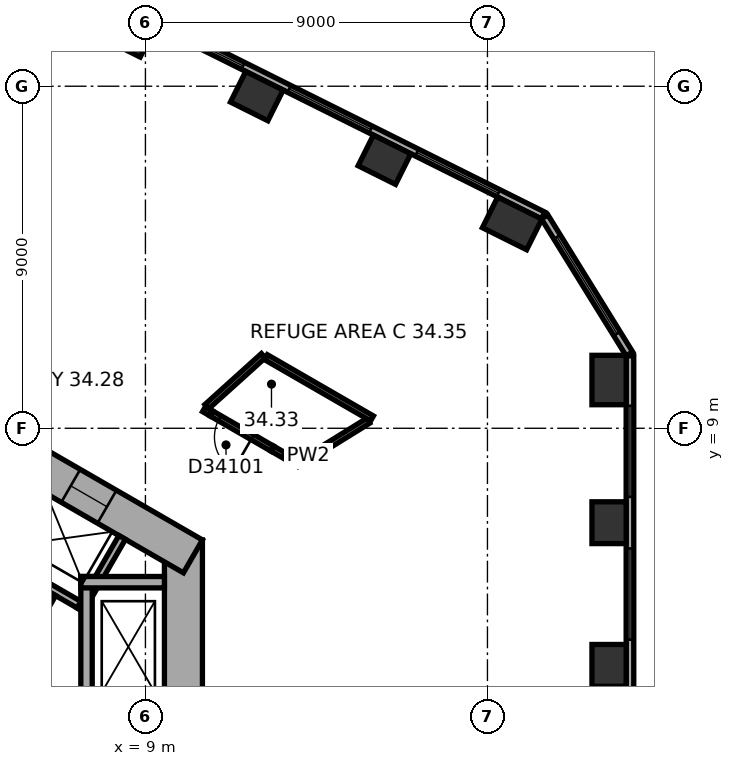
"""IFC4 building model, lengths in metres.
Left out: names, types, materials, properties, quantities, classifications, styles, units other than length and angle.
Written with IfcOpenShell. Run it as: python <this file> out.ifc"""

import sys

from ifc_helpers import new_model, si_unit, direction, frame, frame_2d, origin, origin_2d, place, context, subcontext, project, spatial, rectangle, extrude, element, fill, save


model = new_model("IFC4")
c1 = context("Model", 3, precision=1e-05, world=origin(), true_north=direction((0.0, 1.0)))
c2 = subcontext(c1, "Body", "Model", "MODEL_VIEW")
j1 = project(units=[si_unit("LENGTHUNIT", "METRE"), si_unit("PLANEANGLEUNIT", "RADIAN")], contexts=[c1])
p1 = place(None, origin())
s1 = spatial("IfcSite", under=j1, at=p1, CompositionType="ELEMENT")
p2 = place(p1, origin())
s2 = spatial("IfcBuilding", under=s1, at=p2, CompositionType="ELEMENT")
p3 = place(p2, frame((0.0, 0.0, 139.2)))
s3 = spatial("IfcBuildingStorey", under=s2, at=p3, CompositionType="ELEMENT", Elevation=139.2)
for number, where, z_axis, x_axis in (
    (1, (21.2, 2.761, 0.0), (0.0, 0.0, 1.0), (0.0, 1.0, 0.0)),
    (2, (21.2, 6.515, 0.0), (0.0, 0.0, 1.0), (0.0, 1.0, 0.0)),
):
    element("IfcColumn", number, at=place(p3, frame(where, z_axis=z_axis, x_axis=x_axis)), inside=s3, PredefinedType="COLUMN", context=c2, shape_type="SweptSolid", body=[
        extrude(rectangle(XDim=1.1, YDim=0.9, at=origin_2d()), origin(), (0.0, 0.0, 1.0), 7.4),
    ])
for number, where, z_axis, x_axis in (
    (3, (21.2, 10.27, 0.0), (0.0, 0.0, 1.0), (0.0, 1.0, 0.0)),
    (4, (18.65, 14.39, 0.0), (0.0, 0.0, 1.0), (-0.895, 0.446, 0.0)),
):
    element("IfcColumn", number, at=place(p3, frame(where, z_axis=z_axis, x_axis=x_axis)), inside=s3, PredefinedType="COLUMN", context=c2, shape_type="SweptSolid", body=[
        extrude(rectangle(XDim=1.3, YDim=0.9, at=origin_2d()), origin(), (0.0, 0.0, 1.0), 7.4),
    ])
for number, where, z_axis, x_axis in (
    (5, (15.29, 16.065, 0.0), (0.0, 0.0, 1.0), (-0.895, 0.446, 0.0)),
    (6, (11.931, 17.74, 0.0), (0.0, 0.0, 1.0), (-0.895, 0.446, 0.0)),
    (7, (8.571, 19.416, 0.0), (0.0, 0.0, 1.0), (-0.895, 0.446, 0.0)),
):
    element("IfcColumn", number, at=place(p3, frame(where, z_axis=z_axis, x_axis=x_axis)), inside=s3, PredefinedType="COLUMN", context=c2, shape_type="SweptSolid", body=[
        extrude(rectangle(XDim=1.1, YDim=0.9, at=origin_2d()), origin(), (0.0, 0.0, 1.0), 7.4),
    ])
p4 = place(p3, frame((10.0, -6.062, 0.0), z_axis=(0.0, 0.0, 1.0), x_axis=(0.0, 1.0, 0.0)))
e8 = element("IfcWall", 8, at=p4, inside=s3, PredefinedType="SHEAR", context=c2, shape_type="SweptSolid", body=[
    extrude(rectangle(XDim=12.125, YDim=1.0, at=frame_2d((6.062, 0.0))), origin(), (0.0, 0.0, 1.0), 7.4),
])
p5 = place(p4, frame((6.262, 0.0, 0.0)))
e9 = element("IfcOpeningElement", 9, at=p5, cuts=e8, PredefinedType="OPENING", context=c2, shape_type="SweptSolid", body=[
    extrude(rectangle(XDim=1.5, YDim=2.1, at=frame_2d((0.75, 1.05))), frame((0.0, 0.51, 0.0), z_axis=(0.0, -1.0, 0.0), x_axis=(1.0, 0.0, 0.0)), (0.0, 0.0, 1.0), 1.02),
])
p6 = place(p4, frame((1.712, 0.0, 0.0)))
e10 = element("IfcOpeningElement", 10, at=p6, cuts=e8, PredefinedType="OPENING", context=c2, shape_type="SweptSolid", body=[
    extrude(rectangle(XDim=1.1, YDim=2.1, at=frame_2d((0.55, 1.05))), frame((0.0, 0.51, 0.0), z_axis=(0.0, -1.0, 0.0), x_axis=(1.0, 0.0, 0.0)), (0.0, 0.0, 1.0), 1.02),
])
p7 = place(p4, frame((4.312, 0.0, 0.0)))
e11 = element("IfcOpeningElement", 11, at=p7, cuts=e8, PredefinedType="OPENING", context=c2, shape_type="SweptSolid", body=[
    extrude(rectangle(XDim=1.1, YDim=2.1, at=frame_2d((0.55, 1.05))), frame((0.0, 0.51, 0.0), z_axis=(0.0, -1.0, 0.0), x_axis=(1.0, 0.0, 0.0)), (0.0, 0.0, 1.0), 1.02),
])
p8 = place(p3, frame((10.25, 5.629, 0.0), z_axis=(0.0, 0.0, 1.0), x_axis=(-0.866022616891, 0.50000482701, 0.0)))
e12 = element("IfcWall", 12, at=p8, inside=s3, PredefinedType="SHEAR", context=c2, shape_type="SweptSolid", body=[
    extrude(rectangle(XDim=12.125, YDim=1.0, at=frame_2d((6.062, 0.0))), origin(), (0.0, 0.0, 1.0), 7.4),
])
p9 = place(p8, frame((2.612, 0.0, 0.0)))
e13 = element("IfcOpeningElement", 13, at=p9, cuts=e12, PredefinedType="OPENING", context=c2, shape_type="SweptSolid", body=[
    extrude(rectangle(XDim=1.1, YDim=2.1, at=frame_2d((0.55, 1.05))), frame((0.0, 0.51, 0.0), z_axis=(0.0, -1.0, 0.0), x_axis=(1.0, 0.0, 0.0)), (0.0, 0.0, 1.0), 1.02),
])
p10 = place(p8, frame((5.212, 0.0, 0.0)))
e14 = element("IfcOpeningElement", 14, at=p10, cuts=e12, PredefinedType="OPENING", context=c2, shape_type="SweptSolid", body=[
    extrude(rectangle(XDim=1.1, YDim=2.1, at=frame_2d((0.55, 1.05))), frame((0.0, 0.51, 0.0), z_axis=(0.0, -1.0, 0.0), x_axis=(1.0, 0.0, 0.0)), (0.0, 0.0, 1.0), 1.02),
])
p11 = place(p8, frame((7.812, 0.0, 0.0)))
e15 = element("IfcOpeningElement", 15, at=p11, cuts=e12, PredefinedType="OPENING", context=c2, shape_type="SweptSolid", body=[
    extrude(rectangle(XDim=1.1, YDim=2.1, at=frame_2d((0.55, 1.05))), frame((0.0, 0.51, 0.0), z_axis=(0.0, -1.0, 0.0), x_axis=(1.0, 0.0, 0.0)), (0.0, 0.0, 1.0), 1.02),
])
p12 = place(p3, frame((21.75, -9.138, 0.0), z_axis=(0.0, 0.0, 1.0), x_axis=(0.0, 1.0, 0.0)))
e16 = element("IfcWall", 16, at=p12, inside=s3, PredefinedType="STANDARD", context=c2, shape_type="SweptSolid", body=[
    extrude(rectangle(XDim=20.044, YDim=0.2, at=frame_2d((10.022, 0.0))), origin(), (0.0, 0.0, 1.0), 7.4),
])
p13 = place(p12, frame((1.314, 0.0, 0.8)))
e17 = element("IfcOpeningElement", 17, at=p13, cuts=e16, PredefinedType="OPENING", context=c2, shape_type="SweptSolid", body=[
    extrude(rectangle(XDim=2.4, YDim=4.2, at=frame_2d((1.2, 2.1))), frame((0.0, 0.11, 0.0), z_axis=(0.0, -1.0, 0.0), x_axis=(1.0, 0.0, 0.0)), (0.0, 0.0, 1.0), 0.22),
])
p14 = place(p12, frame((5.069, 0.0, 0.8)))
e18 = element("IfcOpeningElement", 18, at=p14, cuts=e16, PredefinedType="OPENING", context=c2, shape_type="SweptSolid", body=[
    extrude(rectangle(XDim=2.4, YDim=4.2, at=frame_2d((1.2, 2.1))), frame((0.0, 0.11, 0.0), z_axis=(0.0, -1.0, 0.0), x_axis=(1.0, 0.0, 0.0)), (0.0, 0.0, 1.0), 0.22),
])
p15 = place(p12, frame((8.823, 0.0, 0.8)))
e19 = element("IfcOpeningElement", 19, at=p15, cuts=e16, PredefinedType="OPENING", context=c2, shape_type="SweptSolid", body=[
    extrude(rectangle(XDim=2.4, YDim=4.2, at=frame_2d((1.2, 2.1))), frame((0.0, 0.11, 0.0), z_axis=(0.0, -1.0, 0.0), x_axis=(1.0, 0.0, 0.0)), (0.0, 0.0, 1.0), 0.22),
])
p16 = place(p12, frame((12.577, 0.0, 0.8)))
e20 = element("IfcOpeningElement", 20, at=p16, cuts=e16, PredefinedType="OPENING", context=c2, shape_type="SweptSolid", body=[
    extrude(rectangle(XDim=2.4, YDim=4.2, at=frame_2d((1.2, 2.1))), frame((0.0, 0.11, 0.0), z_axis=(0.0, -1.0, 0.0), x_axis=(1.0, 0.0, 0.0)), (0.0, 0.0, 1.0), 0.22),
])
p17 = place(p12, frame((16.331, 0.0, 0.8)))
e21 = element("IfcOpeningElement", 21, at=p17, cuts=e16, PredefinedType="OPENING", context=c2, shape_type="SweptSolid", body=[
    extrude(rectangle(XDim=2.4, YDim=4.2, at=frame_2d((1.2, 2.1))), frame((0.0, 0.11, 0.0), z_axis=(0.0, -1.0, 0.0), x_axis=(1.0, 0.0, 0.0)), (0.0, 0.0, 1.0), 0.22),
])
p18 = place(p3, frame((21.735, 10.958, 0.0), z_axis=(0.0, 0.0, 1.0), x_axis=(-0.526213807775, 0.850352296702, 0.0)))
e22 = element("IfcWall", 22, at=p18, inside=s3, PredefinedType="STANDARD", context=c2, shape_type="SweptSolid", body=[
    extrude(rectangle(XDim=4.238, YDim=0.2, at=frame_2d((2.119, 0.0))), origin(), (0.0, 0.0, 1.0), 7.4),
])
p19 = place(p18, frame((0.619, 0.0, 0.8)))
e23 = element("IfcOpeningElement", 23, at=p19, cuts=e22, PredefinedType="OPENING", context=c2, shape_type="SweptSolid", body=[
    extrude(rectangle(XDim=3.0, YDim=4.2, at=frame_2d((1.5, 2.1))), frame((0.0, 0.11, 0.0), z_axis=(0.0, -1.0, 0.0), x_axis=(1.0, 0.0, 0.0)), (0.0, 0.0, 1.0), 0.22),
])
p20 = place(p3, frame((19.464, 14.599, 0.0), z_axis=(0.0, 0.0, 1.0), x_axis=(-0.894935755043, 0.446195018289, 0.0)))
e24 = element("IfcWall", 24, at=p20, inside=s3, PredefinedType="STANDARD", context=c2, shape_type="SweptSolid", body=[
    extrude(rectangle(XDim=20.044, YDim=0.2, at=frame_2d((10.022, 0.0))), origin(), (0.0, 0.0, 1.0), 7.4),
])
p21 = place(p20, frame((1.313, 0.0, 0.8)))
e25 = element("IfcOpeningElement", 25, at=p21, cuts=e24, PredefinedType="OPENING", context=c2, shape_type="SweptSolid", body=[
    extrude(rectangle(XDim=2.4, YDim=4.2, at=frame_2d((1.2, 2.1))), frame((0.0, 0.11, 0.0), z_axis=(0.0, -1.0, 0.0), x_axis=(1.0, 0.0, 0.0)), (0.0, 0.0, 1.0), 0.22),
])
p22 = place(p20, frame((5.067, 0.0, 0.8)))
e26 = element("IfcOpeningElement", 26, at=p22, cuts=e24, PredefinedType="OPENING", context=c2, shape_type="SweptSolid", body=[
    extrude(rectangle(XDim=2.4, YDim=4.2, at=frame_2d((1.2, 2.1))), frame((0.0, 0.11, 0.0), z_axis=(0.0, -1.0, 0.0), x_axis=(1.0, 0.0, 0.0)), (0.0, 0.0, 1.0), 0.22),
])
p23 = place(p20, frame((8.821, 0.0, 0.8)))
e27 = element("IfcOpeningElement", 27, at=p23, cuts=e24, PredefinedType="OPENING", context=c2, shape_type="SweptSolid", body=[
    extrude(rectangle(XDim=2.4, YDim=4.2, at=frame_2d((1.2, 2.1))), frame((0.0, 0.11, 0.0), z_axis=(0.0, -1.0, 0.0), x_axis=(1.0, 0.0, 0.0)), (0.0, 0.0, 1.0), 0.22),
])
p24 = place(p20, frame((12.575, 0.0, 0.8)))
e28 = element("IfcOpeningElement", 28, at=p24, cuts=e24, PredefinedType="OPENING", context=c2, shape_type="SweptSolid", body=[
    extrude(rectangle(XDim=2.4, YDim=4.2, at=frame_2d((1.2, 2.1))), frame((0.0, 0.11, 0.0), z_axis=(0.0, -1.0, 0.0), x_axis=(1.0, 0.0, 0.0)), (0.0, 0.0, 1.0), 0.22),
])
p25 = place(p20, frame((16.329, 0.0, 0.8)))
e29 = element("IfcOpeningElement", 29, at=p25, cuts=e24, PredefinedType="OPENING", context=c2, shape_type="SweptSolid", body=[
    extrude(rectangle(XDim=2.4, YDim=4.2, at=frame_2d((1.2, 2.1))), frame((0.0, 0.11, 0.0), z_axis=(0.0, -1.0, 0.0), x_axis=(1.0, 0.0, 0.0)), (0.0, 0.0, 1.0), 0.22),
])
p26 = place(p3, frame((7.424, 4.259, 0.0), z_axis=(0.0, 0.0, 1.0), x_axis=(-0.866026010844, 0.49999894854, 0.0)))
e30 = element("IfcWall", 30, at=p26, inside=s3, PredefinedType="PARTITIONING", context=c2, shape_type="SweptSolid", body=[
    extrude(rectangle(XDim=8.0, YDim=0.2, at=frame_2d((4.0, 0.0))), origin(), (0.0, 0.0, 1.0), 7.12),
])
p27 = place(p3, frame((7.287, 4.222, 0.0), z_axis=(0.0, 0.0, 1.0), x_axis=(0.499946605688, 0.86605622881, 0.0)))
e31 = element("IfcWall", 31, at=p27, inside=s3, PredefinedType="PARTITIONING", context=c2, shape_type="SweptSolid", body=[
    extrude(rectangle(XDim=2.2, YDim=0.2, at=frame_2d((1.1, 0.0))), origin(), (0.0, 0.0, 1.0), 7.12),
])
p28 = place(p3, frame((4.158, 0.602, 0.0), z_axis=(0.0, 0.0, 1.0), x_axis=(0.499977259774, 0.866038532462, 0.0)))
e32 = element("IfcWall", 32, at=p28, inside=s3, PredefinedType="SHEAR", context=c2, shape_type="SweptSolid", body=[
    extrude(rectangle(XDim=4.7, YDim=0.3, at=frame_2d((2.35, 0.0))), origin(), (0.0, 0.0, 1.0), 7.12),
])
p29 = place(p28, frame((0.8, 0.0, 0.0)))
e33 = element("IfcOpeningElement", 33, at=p29, cuts=e32, PredefinedType="OPENING", context=c2, shape_type="SweptSolid", body=[
    extrude(rectangle(XDim=1.2, YDim=2.1, at=frame_2d((0.6, 1.05))), frame((0.0, 0.16, 0.0), z_axis=(0.0, -1.0, 0.0), x_axis=(1.0, 0.0, 0.0)), (0.0, 0.0, 1.0), 0.32),
])
p30 = place(p3, frame((7.45, 1.75, 0.0), z_axis=(0.0, 0.0, 1.0), x_axis=(0.0, 1.0, 0.0)))
e34 = element("IfcWall", 34, at=p30, inside=s3, PredefinedType="SHEAR", context=c2, shape_type="SweptSolid", body=[
    extrude(rectangle(XDim=3.35, YDim=0.3, at=frame_2d((1.675, 0.0))), origin(), (0.0, 0.0, 1.0), 7.12),
])
p31 = place(p3, frame((7.3, 4.95, 0.0), z_axis=(0.0, 0.0, 1.0), x_axis=(1.0, 0.0, 0.0)))
e35 = element("IfcWall", 35, at=p31, inside=s3, PredefinedType="SHEAR", context=c2, shape_type="SweptSolid", body=[
    extrude(rectangle(XDim=2.2, YDim=0.3, at=frame_2d((1.1, 0.0))), origin(), (0.0, 0.0, 1.0), 7.12),
])
p32 = place(p3, frame((13.032, 8.064, 0.0), z_axis=(0.0, 0.0, 1.0), x_axis=(-0.865926680471, 0.500170954823, 0.0)))
e36 = element("IfcWall", 36, at=p32, inside=s3, PredefinedType="PARTITIONING", context=c2, shape_type="SweptSolid", body=[
    extrude(rectangle(XDim=0.801, YDim=0.15, at=frame_2d((0.4, 0.0))), origin(), (0.0, 0.0, 1.0), 7.12),
])
p33 = place(p3, frame((12.338, 8.465, 0.0), z_axis=(0.0, 0.0, 1.0), x_axis=(-0.866111002094, 0.499851710062, 0.0)))
e37 = element("IfcWall", 37, at=p33, inside=s3, PredefinedType="PARTITIONING", context=c2, shape_type="SweptSolid", body=[
    extrude(rectangle(XDim=1.853, YDim=0.15, at=frame_2d((0.927, 0.0))), origin(), (0.0, 0.0, 1.0), 7.12),
])
p34 = place(p33, frame((0.603, 0.0, 0.0)))
e38 = element("IfcOpeningElement", 38, at=p34, cuts=e37, PredefinedType="OPENING", context=c2, shape_type="SweptSolid", body=[
    extrude(rectangle(XDim=1.0, YDim=2.1, at=frame_2d((0.5, 1.05))), frame((0.0, 0.085, 0.0), z_axis=(0.0, -1.0, 0.0), x_axis=(1.0, 0.0, 0.0)), (0.0, 0.0, 1.0), 0.17),
])
p35 = place(p3, frame((14.86, 9.196, 0.0), z_axis=(0.0, 0.0, 1.0), x_axis=(-0.850404527443, -0.526129394451, 0.0)))
e39 = element("IfcWall", 39, at=p35, inside=s3, PredefinedType="PARTITIONING", context=c2, shape_type="SweptSolid", body=[
    extrude(rectangle(XDim=2.09, YDim=0.15, at=frame_2d((1.045, 0.0))), origin(), (0.0, 0.0, 1.0), 7.12),
])
p36 = place(p3, frame((10.733, 9.391, 0.0), z_axis=(0.0, 0.0, 1.0), x_axis=(-0.866002566612, 0.500039553057, 0.0)))
e40 = element("IfcWall", 40, at=p36, inside=s3, PredefinedType="PARTITIONING", context=c2, shape_type="SweptSolid", body=[
    extrude(rectangle(XDim=0.222, YDim=0.15, at=frame_2d((0.111, 0.0))), origin(), (0.0, 0.0, 1.0), 7.12),
])
p37 = place(p3, frame((10.615, 9.57, 0.0), z_axis=(0.0, 0.0, 1.0), x_axis=(0.742681485431, 0.669644839597, 0.0)))
e41 = element("IfcWall", 41, at=p37, inside=s3, PredefinedType="PARTITIONING", context=c2, shape_type="SweptSolid", body=[
    extrude(rectangle(XDim=2.002, YDim=0.15, at=frame_2d((1.001, 0.0))), origin(), (0.0, 0.0, 1.0), 7.12),
])
p38 = place(p3, frame((12.172, 10.871, 0.0), z_axis=(0.0, 0.0, 1.0), x_axis=(0.86596351105, -0.500107186041, 0.0)))
e42 = element("IfcWall", 42, at=p38, inside=s3, PredefinedType="PARTITIONING", context=c2, shape_type="SweptSolid", body=[
    extrude(rectangle(XDim=3.222, YDim=0.15, at=frame_2d((1.611, 0.0))), origin(), (0.0, 0.0, 1.0), 7.12),
])
p39 = place(p16, origin())
e43 = element("IfcWindow", 43, at=p39, inside=s3, PartitioningType="SINGLE_PANEL", PredefinedType="WINDOW", context=c2, shape_type="SweptSolid", body=[
    extrude(rectangle(XDim=2.4, YDim=4.2, at=frame_2d((1.2, 2.1))), frame((0.0, 0.03, 0.0), z_axis=(0.0, -1.0, 0.0), x_axis=(1.0, 0.0, 0.0)), (0.0, 0.0, 1.0), 0.06),
])
fill(e20, e43)
p40 = place(p17, origin())
e44 = element("IfcWindow", 44, at=p40, inside=s3, PartitioningType="SINGLE_PANEL", PredefinedType="WINDOW", context=c2, shape_type="SweptSolid", body=[
    extrude(rectangle(XDim=2.4, YDim=4.2, at=frame_2d((1.2, 2.1))), frame((0.0, 0.03, 0.0), z_axis=(0.0, -1.0, 0.0), x_axis=(1.0, 0.0, 0.0)), (0.0, 0.0, 1.0), 0.06),
])
fill(e21, e44)
p41 = place(p19, origin())
e45 = element("IfcWindow", 45, at=p41, inside=s3, PartitioningType="SINGLE_PANEL", PredefinedType="WINDOW", context=c2, shape_type="SweptSolid", body=[
    extrude(rectangle(XDim=3.0, YDim=4.2, at=frame_2d((1.5, 2.1))), frame((0.0, 0.03, 0.0), z_axis=(0.0, -1.0, 0.0), x_axis=(1.0, 0.0, 0.0)), (0.0, 0.0, 1.0), 0.06),
])
fill(e23, e45)
p42 = place(p21, origin())
e46 = element("IfcWindow", 46, at=p42, inside=s3, PartitioningType="SINGLE_PANEL", PredefinedType="WINDOW", context=c2, shape_type="SweptSolid", body=[
    extrude(rectangle(XDim=2.4, YDim=4.2, at=frame_2d((1.2, 2.1))), frame((0.0, 0.03, 0.0), z_axis=(0.0, -1.0, 0.0), x_axis=(1.0, 0.0, 0.0)), (0.0, 0.0, 1.0), 0.06),
])
fill(e25, e46)
p43 = place(p22, origin())
e47 = element("IfcWindow", 47, at=p43, inside=s3, PartitioningType="SINGLE_PANEL", PredefinedType="WINDOW", context=c2, shape_type="SweptSolid", body=[
    extrude(rectangle(XDim=2.4, YDim=4.2, at=frame_2d((1.2, 2.1))), frame((0.0, 0.03, 0.0), z_axis=(0.0, -1.0, 0.0), x_axis=(1.0, 0.0, 0.0)), (0.0, 0.0, 1.0), 0.06),
])
fill(e26, e47)
p44 = place(p23, origin())
e48 = element("IfcWindow", 48, at=p44, inside=s3, PartitioningType="SINGLE_PANEL", PredefinedType="WINDOW", context=c2, shape_type="SweptSolid", body=[
    extrude(rectangle(XDim=2.4, YDim=4.2, at=frame_2d((1.2, 2.1))), frame((0.0, 0.03, 0.0), z_axis=(0.0, -1.0, 0.0), x_axis=(1.0, 0.0, 0.0)), (0.0, 0.0, 1.0), 0.06),
])
fill(e27, e48)
p45 = place(p9, origin())
e49 = element("IfcDoor", 49, at=p45, inside=s3, OperationType="DOUBLE_DOOR_SLIDING", PredefinedType="DOOR", context=c2, shape_type="SweptSolid", body=[
    extrude(rectangle(XDim=1.1, YDim=2.1, at=frame_2d((0.55, 1.05))), frame((0.0, 0.025, 0.0), z_axis=(0.0, -1.0, 0.0), x_axis=(1.0, 0.0, 0.0)), (0.0, 0.0, 1.0), 0.05),
])
fill(e13, e49)
p46 = place(p34, origin())
e50 = element("IfcDoor", 50, at=p46, inside=s3, OperationType="SINGLE_SWING_LEFT", PredefinedType="DOOR", context=c2, shape_type="SweptSolid", body=[
    extrude(rectangle(XDim=1.0, YDim=2.1, at=frame_2d((0.5, 1.05))), frame((0.0, 0.025, 0.0), z_axis=(0.0, -1.0, 0.0), x_axis=(1.0, 0.0, 0.0)), (0.0, 0.0, 1.0), 0.05),
])
fill(e38, e50)
save(model, sys.argv[1])
